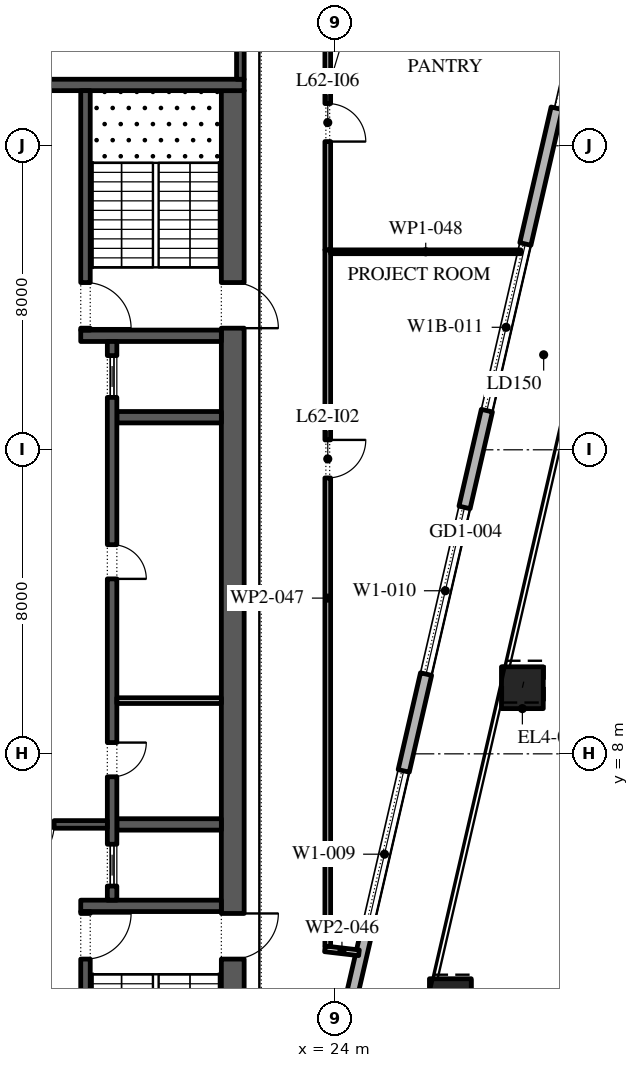
"""IFC4 building model, lengths in metres.
Left out: names, types, materials, properties, quantities, classifications, styles, units other than length and angle.
Written with IfcOpenShell. Run it as: python <this file> out.ifc"""

import sys

from ifc_helpers import new_model, si_unit, direction, frame, frame_2d, origin, origin_2d, place, context, subcontext, project, spatial, rectangle, extrude, element, fill, save


model = new_model("IFC4")
c1 = context("Model", 3, precision=1e-05, world=origin(), true_north=direction((0.0, 1.0)))
c2 = subcontext(c1, "Body", "Model", "MODEL_VIEW")
j1 = project(units=[si_unit("LENGTHUNIT", "METRE"), si_unit("PLANEANGLEUNIT", "RADIAN")], contexts=[c1])
p1 = place(None, origin())
s1 = spatial("IfcSite", under=j1, at=p1, CompositionType="ELEMENT")
p2 = place(p1, origin())
s2 = spatial("IfcBuilding", under=s1, at=p2, CompositionType="ELEMENT")
p3 = place(p2, frame((0.0, 0.0, 285.0)))
s3 = spatial("IfcBuildingStorey", under=s2, at=p3, CompositionType="ELEMENT", Elevation=285.0)
p4 = place(p3, frame((27.026, 1.532, 0.0), z_axis=(0.005810983994, 0.025277780376, 0.999663576552), x_axis=(-0.974579651079, 0.224041299099, 0.0)))
e1 = element("IfcColumn", 1, at=p4, inside=s3, PredefinedType="COLUMN", context=c2, shape_type="SweptSolid", body=[
    extrude(rectangle(XDim=1.1, YDim=1.1, at=origin_2d()), origin(), (0.0, 0.0, 1.0), 4.201),
])
p5 = place(p3, frame((28.921, 9.74, 0.0), z_axis=(0.008770884695, 0.037929719907, 0.99924191662), x_axis=(-0.974290512438, 0.225295355862, 0.0)))
e2 = element("IfcColumn", 2, at=p5, inside=s3, PredefinedType="COLUMN", context=c2, shape_type="SweptSolid", body=[
    extrude(rectangle(XDim=1.1, YDim=1.1, at=origin_2d()), origin(), (0.0, 0.0, 1.0), 4.203),
])
p6 = place(p3, frame((21.359, -11.678, 0.0), z_axis=(0.0, 0.0, 1.0), x_axis=(0.224949198343, 0.974370493275, 0.0)))
e3 = element("IfcWall", 3, at=p6, inside=s3, PredefinedType="STANDARD", context=c2, shape_type="SweptSolid", body=[
    extrude(rectangle(XDim=49.5, YDim=0.3, at=frame_2d((24.75, 0.0))), origin(), (0.0, 0.0, 1.0), 4.0),
])
p7 = place(p6, frame((1.157, 0.0, 0.45)))
e4 = element("IfcOpeningElement", 4, at=p7, cuts=e3, PredefinedType="OPENING", context=c2, shape_type="SweptSolid", body=[
    extrude(rectangle(XDim=4.5, YDim=3.05, at=frame_2d((2.25, 1.525))), frame((0.0, 0.16, 0.0), z_axis=(0.0, -1.0, 0.0), x_axis=(1.0, 0.0, 0.0)), (0.0, 0.0, 1.0), 0.32),
])
p8 = place(p6, frame((8.121, 0.0, 0.45)))
e5 = element("IfcOpeningElement", 5, at=p8, cuts=e3, PredefinedType="OPENING", context=c2, shape_type="SweptSolid", body=[
    extrude(rectangle(XDim=4.5, YDim=3.05, at=frame_2d((2.25, 1.525))), frame((0.0, 0.16, 0.0), z_axis=(0.0, -1.0, 0.0), x_axis=(1.0, 0.0, 0.0)), (0.0, 0.0, 1.0), 0.32),
])
p9 = place(p6, frame((15.236, 0.0, 0.45)))
e6 = element("IfcOpeningElement", 6, at=p9, cuts=e3, PredefinedType="OPENING", context=c2, shape_type="SweptSolid", body=[
    extrude(rectangle(XDim=4.5, YDim=3.05, at=frame_2d((2.25, 1.525))), frame((0.0, 0.16, 0.0), z_axis=(0.0, -1.0, 0.0), x_axis=(1.0, 0.0, 0.0)), (0.0, 0.0, 1.0), 0.32),
])
p10 = place(p6, frame((22.35, 0.0, 0.45)))
e7 = element("IfcOpeningElement", 7, at=p10, cuts=e3, PredefinedType="OPENING", context=c2, shape_type="SweptSolid", body=[
    extrude(rectangle(XDim=4.5, YDim=3.05, at=frame_2d((2.25, 1.525))), frame((0.0, 0.16, 0.0), z_axis=(0.0, -1.0, 0.0), x_axis=(1.0, 0.0, 0.0)), (0.0, 0.0, 1.0), 0.32),
])
p11 = place(p6, frame((29.464, 0.0, 0.45)))
e8 = element("IfcOpeningElement", 8, at=p11, cuts=e3, PredefinedType="OPENING", context=c2, shape_type="SweptSolid", body=[
    extrude(rectangle(XDim=4.5, YDim=2.95, at=frame_2d((2.25, 1.475))), frame((0.0, 0.16, 0.0), z_axis=(0.0, -1.0, 0.0), x_axis=(1.0, 0.0, 0.0)), (0.0, 0.0, 1.0), 0.32),
])
p12 = place(p6, frame((37.628, 0.0, 0.0)))
e9 = element("IfcOpeningElement", 9, at=p12, cuts=e3, PredefinedType="OPENING", context=c2, shape_type="SweptSolid", body=[
    extrude(rectangle(XDim=2.4, YDim=3.325, at=frame_2d((1.2, 1.663))), frame((0.0, 0.16, 0.0), z_axis=(0.0, -1.0, 0.0), x_axis=(1.0, 0.0, 0.0)), (0.0, 0.0, 1.0), 0.32),
])
p13 = place(p6, frame((43.693, 0.0, 0.45)))
e10 = element("IfcOpeningElement", 10, at=p13, cuts=e3, PredefinedType="OPENING", context=c2, shape_type="SweptSolid", body=[
    extrude(rectangle(XDim=4.5, YDim=3.05, at=frame_2d((2.25, 1.525))), frame((0.0, 0.16, 0.0), z_axis=(0.0, -1.0, 0.0), x_axis=(1.0, 0.0, 0.0)), (0.0, 0.0, 1.0), 0.32),
])
p14 = place(p3, frame((21.3, -2.45, 0.0), z_axis=(0.0, 0.0, 1.0), x_axis=(0.0, 1.0, 0.0)))
e11 = element("IfcWall", 11, at=p14, inside=s3, PredefinedType="SHEAR", context=c2, shape_type="SweptSolid", body=[
    extrude(rectangle(XDim=27.9, YDim=0.6, at=frame_2d((13.95, 0.0))), origin(), (0.0, 0.0, 1.0), 4.0),
])
p15 = place(p14, frame((5.05, 0.0, 0.0)))
e12 = element("IfcOpeningElement", 12, at=p15, cuts=e11, PredefinedType="OPENING", context=c2, shape_type="SweptSolid", body=[
    extrude(rectangle(XDim=1.2, YDim=2.1, at=frame_2d((0.6, 1.05))), frame((0.0, 0.31, 0.0), z_axis=(0.0, -1.0, 0.0), x_axis=(1.0, 0.0, 0.0)), (0.0, 0.0, 1.0), 0.62),
])
p16 = place(p14, frame((21.65, 0.0, 0.0)))
e13 = element("IfcOpeningElement", 13, at=p16, cuts=e11, PredefinedType="OPENING", context=c2, shape_type="SweptSolid", body=[
    extrude(rectangle(XDim=1.2, YDim=2.1, at=frame_2d((0.6, 1.05))), frame((0.0, 0.31, 0.0), z_axis=(0.0, -1.0, 0.0), x_axis=(1.0, 0.0, 0.0)), (0.0, 0.0, 1.0), 0.62),
])
p17 = place(p3, frame((10.4, 25.6, 0.0), z_axis=(0.0, 0.0, 1.0), x_axis=(1.0, 0.0, 0.0)))
e14 = element("IfcWall", 14, at=p17, inside=s3, PredefinedType="SHEAR", context=c2, shape_type="SweptSolid", body=[
    extrude(rectangle(XDim=11.2, YDim=0.3, at=frame_2d((5.6, 0.0))), origin(), (0.0, 0.0, 1.0), 4.0),
])
p18 = place(p3, frame((17.3, 4.0, 0.0), z_axis=(0.0, 0.0, 1.0), x_axis=(1.0, 0.0, 0.0)))
e15 = element("IfcWall", 15, at=p18, inside=s3, PredefinedType="SHEAR", context=c2, shape_type="SweptSolid", body=[
    extrude(rectangle(XDim=3.7, YDim=0.3, at=frame_2d((1.85, 0.0))), origin(), (0.0, 0.0, 1.0), 4.0),
])
p19 = place(p3, frame((17.425, -2.45, 0.0), z_axis=(0.0, 0.0, 1.0), x_axis=(0.0, 1.0, 0.0)))
e16 = element("IfcWall", 16, at=p19, inside=s3, PredefinedType="SHEAR", context=c2, shape_type="SweptSolid", body=[
    extrude(rectangle(XDim=6.3, YDim=0.25, at=frame_2d((3.15, 0.0))), origin(), (0.0, 0.0, 1.0), 4.0),
])
p20 = place(p19, frame((5.05, 0.0, 0.0)))
e17 = element("IfcOpeningElement", 17, at=p20, cuts=e16, PredefinedType="OPENING", context=c2, shape_type="SweptSolid", body=[
    extrude(rectangle(XDim=1.2, YDim=2.1, at=frame_2d((0.6, 1.05))), frame((0.0, 0.135, 0.0), z_axis=(0.0, -1.0, 0.0), x_axis=(1.0, 0.0, 0.0)), (0.0, 0.0, 1.0), 0.27),
])
p21 = place(p3, frame((17.3, 19.0, 0.0), z_axis=(0.0, 0.0, 1.0), x_axis=(1.0, 0.0, 0.0)))
e18 = element("IfcWall", 18, at=p21, inside=s3, PredefinedType="SHEAR", context=c2, shape_type="SweptSolid", body=[
    extrude(rectangle(XDim=3.7, YDim=0.3, at=frame_2d((1.85, 0.0))), origin(), (0.0, 0.0, 1.0), 4.0),
])
p22 = place(p3, frame((17.425, 19.15, 0.0), z_axis=(0.0, 0.0, 1.0), x_axis=(0.0, 1.0, 0.0)))
e19 = element("IfcWall", 19, at=p22, inside=s3, PredefinedType="SHEAR", context=c2, shape_type="SweptSolid", body=[
    extrude(rectangle(XDim=6.3, YDim=0.25, at=frame_2d((3.15, 0.0))), origin(), (0.0, 0.0, 1.0), 4.0),
])
p23 = place(p22, frame((0.05, 0.0, 0.0)))
e20 = element("IfcOpeningElement", 20, at=p23, cuts=e19, PredefinedType="OPENING", context=c2, shape_type="SweptSolid", body=[
    extrude(rectangle(XDim=1.2, YDim=2.1, at=frame_2d((0.6, 1.05))), frame((0.0, 0.135, 0.0), z_axis=(0.0, -1.0, 0.0), x_axis=(1.0, 0.0, 0.0)), (0.0, 0.0, 1.0), 0.27),
])
for number, where, z_axis, x_axis in (
    (21, (18.25, 6.143, 0.0), (0.0, 0.0, 1.0), (1.0, 0.0, 0.0)),
    (22, (18.25, 16.857, 0.0), (0.0, 0.0, 1.0), (1.0, 0.0, 0.0)),
):
    element("IfcWall", number, at=place(p3, frame(where, z_axis=z_axis, x_axis=x_axis)), inside=s3, PredefinedType="SHEAR", context=c2, shape_type="SweptSolid", body=[
        extrude(rectangle(XDim=2.75, YDim=0.3, at=frame_2d((1.375, 0.0))), origin(), (0.0, 0.0, 1.0), 4.0),
    ])
p24 = place(p3, frame((18.125, 4.15, 0.0), z_axis=(0.0, 0.0, 1.0), x_axis=(0.0, 1.0, 0.0)))
e23 = element("IfcWall", 23, at=p24, inside=s3, PredefinedType="SHEAR", context=c2, shape_type="SweptSolid", body=[
    extrude(rectangle(XDim=14.7, YDim=0.25, at=frame_2d((7.35, 0.0))), origin(), (0.0, 0.0, 1.0), 4.0),
])
p25 = place(p24, frame((3.246, 0.0, 0.0)))
e24 = element("IfcOpeningElement", 24, at=p25, cuts=e23, PredefinedType="OPENING", context=c2, shape_type="SweptSolid", body=[
    extrude(rectangle(XDim=0.9, YDim=2.1, at=frame_2d((0.45, 1.05))), frame((0.0, 0.135, 0.0), z_axis=(0.0, -1.0, 0.0), x_axis=(1.0, 0.0, 0.0)), (0.0, 0.0, 1.0), 0.27),
])
p26 = place(p24, frame((8.454, 0.0, 0.0)))
e25 = element("IfcOpeningElement", 25, at=p26, cuts=e23, PredefinedType="OPENING", context=c2, shape_type="SweptSolid", body=[
    extrude(rectangle(XDim=0.9, YDim=2.1, at=frame_2d((0.45, 1.05))), frame((0.0, 0.135, 0.0), z_axis=(0.0, -1.0, 0.0), x_axis=(1.0, 0.0, 0.0)), (0.0, 0.0, 1.0), 0.27),
])
p27 = place(p24, frame((0.371, 0.0, 0.0)))
e26 = element("IfcOpeningElement", 26, at=p27, cuts=e23, PredefinedType="OPENING", context=c2, shape_type="SweptSolid", body=[
    extrude(rectangle(XDim=1.1, YDim=2.1, at=frame_2d((0.55, 1.05))), frame((0.0, 0.135, 0.0), z_axis=(0.0, -1.0, 0.0), x_axis=(1.0, 0.0, 0.0)), (0.0, 0.0, 1.0), 0.27),
])
p28 = place(p24, frame((13.229, 0.0, 0.0)))
e27 = element("IfcOpeningElement", 27, at=p28, cuts=e23, PredefinedType="OPENING", context=c2, shape_type="SweptSolid", body=[
    extrude(rectangle(XDim=1.1, YDim=2.1, at=frame_2d((0.55, 1.05))), frame((0.0, 0.135, 0.0), z_axis=(0.0, -1.0, 0.0), x_axis=(1.0, 0.0, 0.0)), (0.0, 0.0, 1.0), 0.27),
])
p29 = place(p3, frame((18.25, 9.4, 0.0), z_axis=(0.0, 0.0, 1.0), x_axis=(1.0, 0.0, 0.0)))
e28 = element("IfcWall", 28, at=p29, inside=s3, PredefinedType="PARTITIONING", context=c2, shape_type="SweptSolid", body=[
    extrude(rectangle(XDim=2.75, YDim=0.15, at=frame_2d((1.375, 0.0))), origin(), (0.0, 0.0, 1.0), 4.0),
])
p30 = place(p3, frame((14.0, 6.143, 0.0), z_axis=(0.0, 0.0, 1.0), x_axis=(1.0, 0.0, 0.0)))
e29 = element("IfcWall", 29, at=p30, inside=s3, PredefinedType="SHEAR", context=c2, shape_type="SweptSolid", body=[
    extrude(rectangle(XDim=4.0, YDim=0.2, at=frame_2d((2.0, 0.0))), origin(), (0.0, 0.0, 1.0), 4.0),
])
p31 = place(p30, frame((1.4, 0.0, 0.0)))
e30 = element("IfcOpeningElement", 30, at=p31, cuts=e29, PredefinedType="OPENING", context=c2, shape_type="SweptSolid", body=[
    extrude(rectangle(XDim=1.2, YDim=2.1, at=frame_2d((0.6, 1.05))), frame((0.0, 0.11, 0.0), z_axis=(0.0, -1.0, 0.0), x_axis=(1.0, 0.0, 0.0)), (0.0, 0.0, 1.0), 0.22),
])
p32 = place(p3, frame((21.5, 25.75, 0.0), z_axis=(0.0, 0.0, 1.0), x_axis=(0.0, 1.0, 0.0)))
e31 = element("IfcWall", 31, at=p32, inside=s3, PredefinedType="SHEAR", context=c2, shape_type="SweptSolid", body=[
    extrude(rectangle(XDim=4.75, YDim=0.2, at=frame_2d((2.375, 0.0))), origin(), (0.0, 0.0, 1.0), 4.0),
])
p33 = place(p32, frame((1.925, 0.0, 0.0)))
e32 = element("IfcOpeningElement", 32, at=p33, cuts=e31, PredefinedType="OPENING", context=c2, shape_type="SweptSolid", body=[
    extrude(rectangle(XDim=0.9, YDim=2.1, at=frame_2d((0.45, 1.05))), frame((0.0, 0.11, 0.0), z_axis=(0.0, -1.0, 0.0), x_axis=(1.0, 0.0, 0.0)), (0.0, 0.0, 1.0), 0.22),
])
p34 = place(p3, frame((23.725, 2.869, 0.0), z_axis=(0.0, 0.0, 1.0), x_axis=(0.993330469257, -0.115302119865, 0.0)))
e33 = element("IfcWall", 33, at=p34, inside=s3, PredefinedType="PARTITIONING", context=c2, shape_type="SweptSolid", body=[
    extrude(rectangle(XDim=0.902, YDim=0.15, at=frame_2d((0.451, 0.0))), origin(), (0.0, 0.0, 1.0), 4.0),
])
p35 = place(p3, frame((23.8, 21.26, 0.0), z_axis=(0.0, 0.0, 1.0), x_axis=(0.0, -1.0, 0.0)))
e34 = element("IfcWall", 34, at=p35, inside=s3, PredefinedType="PARTITIONING", context=c2, shape_type="SweptSolid", body=[
    extrude(rectangle(XDim=18.325, YDim=0.15, at=frame_2d((9.163, 0.0))), origin(), (0.0, 0.0, 1.0), 4.0),
])
p36 = place(p35, frame((5.0, 0.0, 0.0)))
e35 = element("IfcOpeningElement", 35, at=p36, cuts=e34, PredefinedType="OPENING", context=c2, shape_type="SweptSolid", body=[
    extrude(rectangle(XDim=1.0, YDim=2.1, at=frame_2d((0.5, 1.05))), frame((0.0, 0.085, 0.0), z_axis=(0.0, -1.0, 0.0), x_axis=(1.0, 0.0, 0.0)), (0.0, 0.0, 1.0), 0.17),
])
p37 = place(p3, frame((23.875, 21.21, 0.0), z_axis=(0.0, 0.0, 1.0), x_axis=(1.0, 0.0, 0.0)))
e36 = element("IfcWall", 36, at=p37, inside=s3, PredefinedType="PARTITIONING", context=c2, shape_type="SweptSolid", body=[
    extrude(rectangle(XDim=5.005, YDim=0.1, at=frame_2d((2.502, 0.0))), origin(), (0.0, 0.0, 1.0), 4.0),
])
p38 = place(p3, frame((23.8, 29.71, 0.0), z_axis=(0.0, 0.0, 1.0), x_axis=(0.0, -1.0, 0.0)))
e37 = element("IfcWall", 37, at=p38, inside=s3, PredefinedType="PARTITIONING", context=c2, shape_type="SweptSolid", body=[
    extrude(rectangle(XDim=8.45, YDim=0.15, at=frame_2d((4.225, 0.0))), origin(), (0.0, 0.0, 1.0), 4.0),
])
p39 = place(p38, frame((4.6, 0.0, 0.0)))
e38 = element("IfcOpeningElement", 38, at=p39, cuts=e37, PredefinedType="OPENING", context=c2, shape_type="SweptSolid", body=[
    extrude(rectangle(XDim=1.0, YDim=2.1, at=frame_2d((0.5, 1.05))), frame((0.0, 0.085, 0.0), z_axis=(0.0, -1.0, 0.0), x_axis=(1.0, 0.0, 0.0)), (0.0, 0.0, 1.0), 0.17),
])
p40 = place(p9, origin())
e39 = element("IfcWindow", 39, at=p40, inside=s3, PartitioningType="DOUBLE_PANEL_VERTICAL", PredefinedType="WINDOW", context=c2, shape_type="SweptSolid", body=[
    extrude(rectangle(XDim=4.5, YDim=3.05, at=frame_2d((2.25, 1.525))), frame((0.0, 0.03, 0.0), z_axis=(0.0, -1.0, 0.0), x_axis=(1.0, 0.0, 0.0)), (0.0, 0.0, 1.0), 0.06),
])
fill(e6, e39)
p41 = place(p10, origin())
e40 = element("IfcWindow", 40, at=p41, inside=s3, PartitioningType="DOUBLE_PANEL_VERTICAL", PredefinedType="WINDOW", context=c2, shape_type="SweptSolid", body=[
    extrude(rectangle(XDim=4.5, YDim=3.05, at=frame_2d((2.25, 1.525))), frame((0.0, 0.03, 0.0), z_axis=(0.0, -1.0, 0.0), x_axis=(1.0, 0.0, 0.0)), (0.0, 0.0, 1.0), 0.06),
])
fill(e7, e40)
p42 = place(p11, origin())
e41 = element("IfcWindow", 41, at=p42, inside=s3, PartitioningType="DOUBLE_PANEL_VERTICAL", PredefinedType="WINDOW", context=c2, shape_type="SweptSolid", body=[
    extrude(rectangle(XDim=4.5, YDim=2.95, at=frame_2d((2.25, 1.475))), frame((0.0, 0.03, 0.0), z_axis=(0.0, -1.0, 0.0), x_axis=(1.0, 0.0, 0.0)), (0.0, 0.0, 1.0), 0.06),
])
fill(e8, e41)
p43 = place(p12, origin())
e42 = element("IfcDoor", 42, at=p43, inside=s3, OperationType="DOUBLE_DOOR_SLIDING", PredefinedType="DOOR", context=c2, shape_type="SweptSolid", body=[
    extrude(rectangle(XDim=2.4, YDim=3.325, at=frame_2d((1.2, 1.663))), frame((0.0, 0.025, 0.0), z_axis=(0.0, -1.0, 0.0), x_axis=(1.0, 0.0, 0.0)), (0.0, 0.0, 1.0), 0.05),
])
fill(e9, e42)
p44 = place(p25, frame((0.9, -0.2, 0.0), z_axis=(0.0, 0.0, 1.0), x_axis=(-1.0, 0.0, 0.0)))
e43 = element("IfcDoor", 43, at=p44, inside=s3, OperationType="SINGLE_SWING_RIGHT", PredefinedType="DOOR", context=c2, shape_type="SweptSolid", body=[
    extrude(rectangle(XDim=0.9, YDim=2.1, at=frame_2d((0.45, 1.05))), frame((0.0, -0.075, 0.0), z_axis=(0.0, -1.0, 0.0), x_axis=(1.0, 0.0, 0.0)), (0.0, 0.0, 1.0), 0.05),
])
fill(e24, e43)
p45 = place(p26, frame((0.9, -0.2, 0.0), z_axis=(0.0, 0.0, 1.0), x_axis=(-1.0, 0.0, 0.0)))
e44 = element("IfcDoor", 44, at=p45, inside=s3, OperationType="SINGLE_SWING_LEFT", PredefinedType="DOOR", context=c2, shape_type="SweptSolid", body=[
    extrude(rectangle(XDim=0.9, YDim=2.1, at=frame_2d((0.45, 1.05))), frame((0.0, -0.075, 0.0), z_axis=(0.0, -1.0, 0.0), x_axis=(1.0, 0.0, 0.0)), (0.0, 0.0, 1.0), 0.05),
])
fill(e25, e44)
p46 = place(p27, origin())
e45 = element("IfcDoor", 45, at=p46, inside=s3, OperationType="SLIDING_TO_LEFT", PredefinedType="DOOR", context=c2, shape_type="SweptSolid", body=[
    extrude(rectangle(XDim=1.1, YDim=2.1, at=frame_2d((0.55, 1.05))), frame((0.0, 0.025, 0.0), z_axis=(0.0, -1.0, 0.0), x_axis=(1.0, 0.0, 0.0)), (0.0, 0.0, 1.0), 0.05),
])
fill(e26, e45)
p47 = place(p28, origin())
e46 = element("IfcDoor", 46, at=p47, inside=s3, OperationType="SLIDING_TO_LEFT", PredefinedType="DOOR", context=c2, shape_type="SweptSolid", body=[
    extrude(rectangle(XDim=1.1, YDim=2.1, at=frame_2d((0.55, 1.05))), frame((0.0, 0.025, 0.0), z_axis=(0.0, -1.0, 0.0), x_axis=(1.0, 0.0, 0.0)), (0.0, 0.0, 1.0), 0.05),
])
fill(e27, e46)
p48 = place(p31, frame((1.2, 0.0, 0.0), z_axis=(0.0, 0.0, 1.0), x_axis=(-1.0, 0.0, 0.0)))
e47 = element("IfcDoor", 47, at=p48, inside=s3, OperationType="SINGLE_SWING_LEFT", PredefinedType="DOOR", context=c2, shape_type="SweptSolid", body=[
    extrude(rectangle(XDim=1.2, YDim=2.1, at=frame_2d((0.6, 1.05))), frame((0.0, 0.025, 0.0), z_axis=(0.0, -1.0, 0.0), x_axis=(1.0, 0.0, 0.0)), (0.0, 0.0, 1.0), 0.05),
])
fill(e30, e47)
p49 = place(p20, frame((1.2, 0.0, 0.0), z_axis=(0.0, 0.0, 1.0), x_axis=(-1.0, 0.0, 0.0)))
e48 = element("IfcDoor", 48, at=p49, inside=s3, OperationType="SINGLE_SWING_RIGHT", PredefinedType="DOOR", context=c2, shape_type="SweptSolid", body=[
    extrude(rectangle(XDim=1.2, YDim=2.1, at=frame_2d((0.6, 1.05))), frame((0.0, 0.025, 0.0), z_axis=(0.0, -1.0, 0.0), x_axis=(1.0, 0.0, 0.0)), (0.0, 0.0, 1.0), 0.05),
])
fill(e17, e48)
p50 = place(p15, frame((1.2, 0.0, 0.0), z_axis=(0.0, 0.0, 1.0), x_axis=(-1.0, 0.0, 0.0)))
e49 = element("IfcDoor", 49, at=p50, inside=s3, OperationType="SINGLE_SWING_RIGHT", PredefinedType="DOOR", context=c2, shape_type="SweptSolid", body=[
    extrude(rectangle(XDim=1.2, YDim=2.1, at=frame_2d((0.6, 1.05))), frame((0.0, 0.025, 0.0), z_axis=(0.0, -1.0, 0.0), x_axis=(1.0, 0.0, 0.0)), (0.0, 0.0, 1.0), 0.05),
])
fill(e12, e49)
p51 = place(p23, frame((1.2, 0.0, 0.0), z_axis=(0.0, 0.0, 1.0), x_axis=(-1.0, 0.0, 0.0)))
e50 = element("IfcDoor", 50, at=p51, inside=s3, OperationType="SINGLE_SWING_LEFT", PredefinedType="DOOR", context=c2, shape_type="SweptSolid", body=[
    extrude(rectangle(XDim=1.2, YDim=2.1, at=frame_2d((0.6, 1.05))), frame((0.0, 0.025, 0.0), z_axis=(0.0, -1.0, 0.0), x_axis=(1.0, 0.0, 0.0)), (0.0, 0.0, 1.0), 0.05),
])
fill(e20, e50)
p52 = place(p16, frame((1.2, 0.0, 0.0), z_axis=(0.0, 0.0, 1.0), x_axis=(-1.0, 0.0, 0.0)))
e51 = element("IfcDoor", 51, at=p52, inside=s3, OperationType="SINGLE_SWING_LEFT", PredefinedType="DOOR", context=c2, shape_type="SweptSolid", body=[
    extrude(rectangle(XDim=1.2, YDim=2.1, at=frame_2d((0.6, 1.05))), frame((0.0, 0.025, 0.0), z_axis=(0.0, -1.0, 0.0), x_axis=(1.0, 0.0, 0.0)), (0.0, 0.0, 1.0), 0.05),
])
fill(e13, e51)
p53 = place(p36, origin())
e52 = element("IfcDoor", 52, at=p53, inside=s3, OperationType="SINGLE_SWING_RIGHT", PredefinedType="DOOR", context=c2, shape_type="SweptSolid", body=[
    extrude(rectangle(XDim=1.0, YDim=2.1, at=frame_2d((0.5, 1.05))), frame((0.0, 0.025, 0.0), z_axis=(0.0, -1.0, 0.0), x_axis=(1.0, 0.0, 0.0)), (0.0, 0.0, 1.0), 0.05),
])
fill(e35, e52)
p54 = place(p39, origin())
e53 = element("IfcDoor", 53, at=p54, inside=s3, OperationType="SINGLE_SWING_LEFT", PredefinedType="DOOR", context=c2, shape_type="SweptSolid", body=[
    extrude(rectangle(XDim=1.0, YDim=2.1, at=frame_2d((0.5, 1.05))), frame((0.0, 0.025, 0.0), z_axis=(0.0, -1.0, 0.0), x_axis=(1.0, 0.0, 0.0)), (0.0, 0.0, 1.0), 0.05),
])
fill(e38, e53)
save(model, sys.argv[1])
